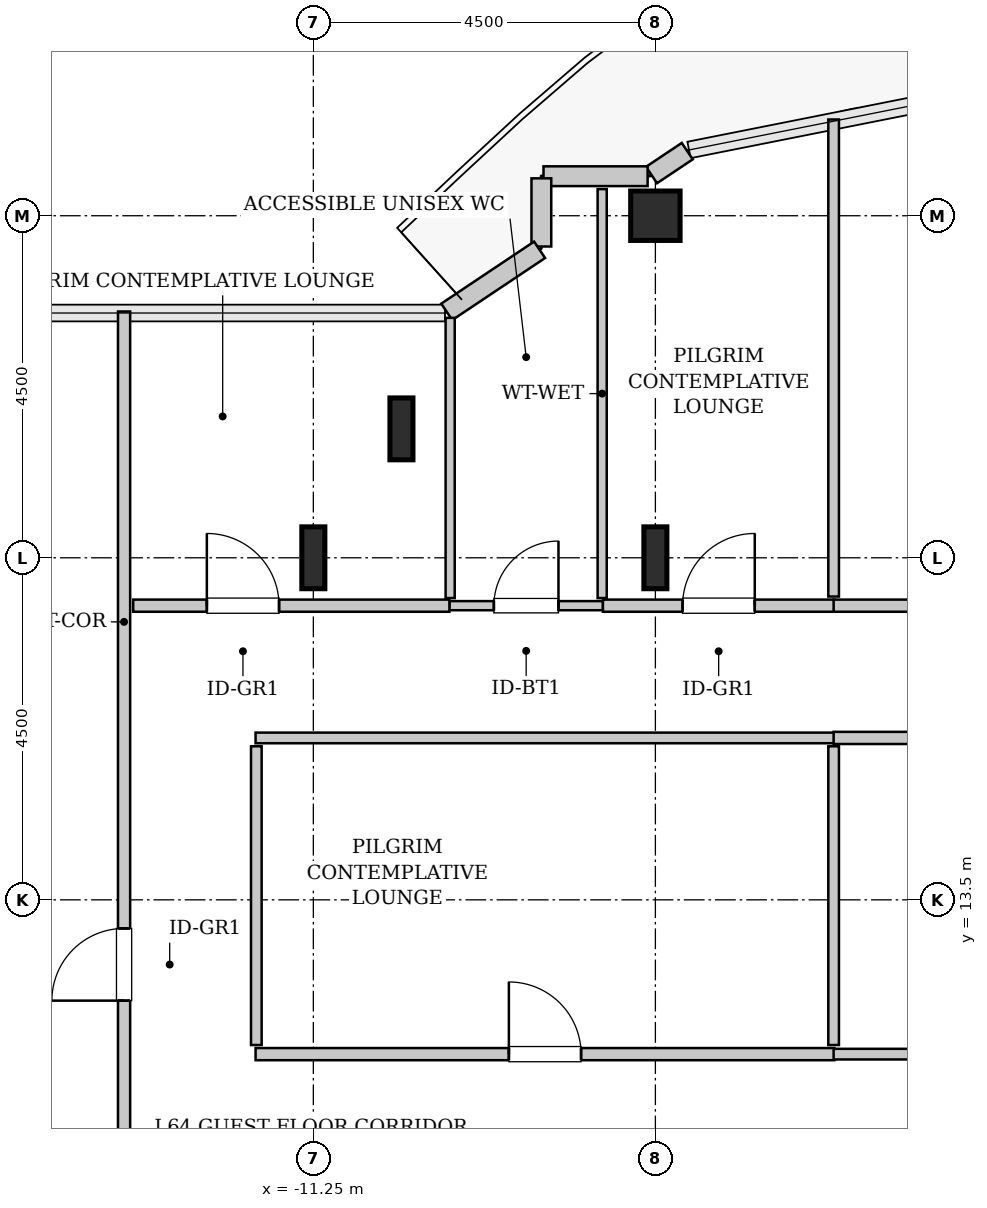
"""IFC4 building model, lengths in metres.
Left out: names, types, materials, properties, quantities, classifications, styles, units other than length and angle.
Written with IfcOpenShell. Run it as: python <this file> out.ifc"""

import sys

from ifc_helpers import new_model, si_unit, direction, frame, frame_2d, origin, origin_2d, place, context, subcontext, project, spatial, rectangle, hollow_rectangle, i_section, extrude, source, transform, mapped, element, fill, save


model = new_model("IFC4")
c1 = context("Model", 3, precision=1e-05, world=origin(), true_north=direction((0.0, 1.0)))
c2 = subcontext(c1, "Body", "Model", "MODEL_VIEW")
j1 = project(units=[si_unit("LENGTHUNIT", "METRE"), si_unit("PLANEANGLEUNIT", "RADIAN")], contexts=[c1])
p1 = place(None, origin())
s1 = spatial("IfcSite", under=j1, at=p1, CompositionType="ELEMENT")
p2 = place(p1, origin())
s2 = spatial("IfcBuilding", under=s1, at=p2, CompositionType="ELEMENT")
p3 = place(p2, frame((0.0, 0.0, 256.0)))
s3 = spatial("IfcBuildingStorey", under=s2, at=p3, CompositionType="ELEMENT", Elevation=256.0)
m1 = source(origin(), c2, "Body", "SweptSolid", [
    extrude(i_section(OverallWidth=0.303, OverallDepth=0.814, WebThickness=0.021, FlangeThickness=0.04, FilletRadius=0.03, at=origin_2d()), origin(), (0.0, 0.0, 1.0), 3.8),
])
for number, where, z_axis, x_axis in (
    (1, (-11.25, 18.0, 0.0), (0.0, 0.0, 1.0), (1.0, 0.0, 0.0)),
    (2, (-10.091, 19.696, 0.0), (0.0, 0.0, 1.0), (1.0, 0.0, 0.0)),
    (3, (-6.75, 18.0, 0.0), (0.0, 0.0, 1.0), (1.0, 0.0, 0.0)),
):
    element("IfcColumn", number, at=place(p3, frame(where, z_axis=z_axis, x_axis=x_axis)), inside=s3, PredefinedType="COLUMN", context=c2, shape_type="MappedRepresentation", body=[
        mapped(m1, transform((0.0, 0.0, 0.0), x_axis=(1.0, 0.0, 0.0), y_axis=(0.0, 1.0, 0.0), z_axis=(0.0, 0.0, 1.0), scale=1.0)),
    ])
m2 = source(origin(), c2, "Body", "SweptSolid", [
    extrude(hollow_rectangle(XDim=0.65, YDim=0.65, WallThickness=0.032, InnerFilletRadius=0.032, OuterFilletRadius=0.064, at=origin_2d()), origin(), (0.0, 0.0, 1.0), 3.8),
])
p4 = place(p3, frame((-6.75, 22.5, 0.0), z_axis=(0.0, 0.0, 1.0), x_axis=(1.0, 0.0, 0.0)))
e4 = element("IfcColumn", 4, at=p4, inside=s3, PredefinedType="COLUMN", context=c2, shape_type="MappedRepresentation", body=[
    mapped(m2, transform((0.0, 0.0, 0.0), x_axis=(1.0, 0.0, 0.0), y_axis=(0.0, 1.0, 0.0), z_axis=(0.0, 0.0, 1.0), scale=1.0)),
])
m3 = source(origin(), c2, "Body", "SweptSolid", [
    extrude(rectangle(XDim=0.565, YDim=0.26, at=frame_2d((0.283, 0.0))), origin(), (0.0, 0.0, 1.0), 3.5),
])
p5 = place(p3, frame((-6.331, 23.35, 0.0), z_axis=(0.0, 0.0, 1.0), x_axis=(-0.831651492666, -0.555297933317, 0.0)))
e5 = element("IfcWall", 5, at=p5, inside=s3, PredefinedType="SOLIDWALL", context=c2, shape_type="MappedRepresentation", body=[
    mapped(m3, transform((0.0, 0.0, 0.0), x_axis=(1.0, 0.0, 0.0), y_axis=(0.0, 1.0, 0.0), z_axis=(0.0, 0.0, 1.0), scale=1.0)),
])
m4 = source(origin(), c2, "Body", "SweptSolid", [
    extrude(rectangle(XDim=1.37, YDim=0.26, at=frame_2d((0.685, 0.0))), origin(), (0.0, 0.0, 1.0), 3.5),
])
p6 = place(p3, frame((-6.852, 23.02, 0.0), z_axis=(0.0, 0.0, 1.0), x_axis=(-1.0, 0.0, 0.0)))
e6 = element("IfcWall", 6, at=p6, inside=s3, PredefinedType="SOLIDWALL", context=c2, shape_type="MappedRepresentation", body=[
    mapped(m4, transform((0.0, 0.0, 0.0), x_axis=(1.0, 0.0, 0.0), y_axis=(0.0, 1.0, 0.0), z_axis=(0.0, 0.0, 1.0), scale=1.0)),
])
m5 = source(origin(), c2, "Body", "SweptSolid", [
    extrude(rectangle(XDim=0.897, YDim=0.26, at=frame_2d((0.448, 0.0))), origin(), (0.0, 0.0, 1.0), 3.5),
])
p7 = place(p3, frame((-8.25, 22.992, 0.0), z_axis=(0.0, 0.0, 1.0), x_axis=(0.0, -1.0, 0.0)))
e7 = element("IfcWall", 7, at=p7, inside=s3, PredefinedType="SOLIDWALL", context=c2, shape_type="MappedRepresentation", body=[
    mapped(m5, transform((0.0, 0.0, 0.0), x_axis=(1.0, 0.0, 0.0), y_axis=(0.0, 1.0, 0.0), z_axis=(0.0, 0.0, 1.0), scale=1.0)),
])
m6 = source(origin(), c2, "Body", "SweptSolid", [
    extrude(rectangle(XDim=1.469, YDim=0.26, at=frame_2d((0.734, 0.0))), origin(), (0.0, 0.0, 1.0), 3.5),
])
p8 = place(p3, frame((-8.273, 22.052, 0.0), z_axis=(0.0, 0.0, 1.0), x_axis=(-0.831461760506, -0.555581983884, 0.0)))
e8 = element("IfcWall", 8, at=p8, inside=s3, PredefinedType="SOLIDWALL", context=c2, shape_type="MappedRepresentation", body=[
    mapped(m6, transform((0.0, 0.0, 0.0), x_axis=(1.0, 0.0, 0.0), y_axis=(0.0, 1.0, 0.0), z_axis=(0.0, 0.0, 1.0), scale=1.0)),
])
m7 = source(origin(), c2, "Body", "SweptSolid", [
    extrude(rectangle(XDim=2.02, YDim=0.12, at=frame_2d((1.01, 0.0))), origin(), (0.0, 0.0, 1.0), 3.485),
])
p9 = place(p3, frame((-9.46, 17.37, 0.0), z_axis=(0.0, 0.0, 1.0), x_axis=(1.0, 0.0, 0.0)))
e9 = element("IfcWall", 9, at=p9, inside=s3, PredefinedType="PLUMBINGWALL", context=c2, shape_type="MappedRepresentation", body=[
    mapped(m7, transform((0.0, 0.0, 0.0), x_axis=(1.0, 0.0, 0.0), y_axis=(0.0, 1.0, 0.0), z_axis=(0.0, 0.0, 1.0), scale=1.0)),
])
p10 = place(p9, frame((0.585, 0.0, 0.0)))
e10 = element("IfcOpeningElement", 10, at=p10, cuts=e9, PredefinedType="OPENING", context=c2, shape_type="SweptSolid", body=[
    extrude(rectangle(XDim=0.85, YDim=2.1, at=frame_2d((0.425, 1.05))), frame((0.0, 0.07, 0.0), z_axis=(0.0, -1.0, 0.0), x_axis=(1.0, 0.0, 0.0)), (0.0, 0.0, 1.0), 0.14),
])
m8 = source(origin(), c2, "Body", "SweptSolid", [
    extrude(rectangle(XDim=5.38, YDim=0.12, at=frame_2d((2.69, 0.0))), origin(), (0.0, 0.0, 1.0), 3.485),
])
p11 = place(p3, frame((-7.45, 17.47, 0.0), z_axis=(0.0, 0.0, 1.0), x_axis=(0.0, 1.0, 0.0)))
e11 = element("IfcWall", 11, at=p11, inside=s3, PredefinedType="PLUMBINGWALL", context=c2, shape_type="MappedRepresentation", body=[
    mapped(m8, transform((0.0, 0.0, 0.0), x_axis=(1.0, 0.0, 0.0), y_axis=(0.0, 1.0, 0.0), z_axis=(0.0, 0.0, 1.0), scale=1.0)),
])
m9 = source(origin(), c2, "Body", "SweptSolid", [
    extrude(rectangle(XDim=3.687, YDim=0.12, at=frame_2d((1.843, 0.0))), origin(), (0.0, 0.0, 1.0), 3.485),
])
p12 = place(p3, frame((-9.45, 17.47, 0.0), z_axis=(0.0, 0.0, 1.0), x_axis=(0.0, 1.0, 0.0)))
e12 = element("IfcWall", 12, at=p12, inside=s3, PredefinedType="PLUMBINGWALL", context=c2, shape_type="MappedRepresentation", body=[
    mapped(m9, transform((0.0, 0.0, 0.0), x_axis=(1.0, 0.0, 0.0), y_axis=(0.0, 1.0, 0.0), z_axis=(0.0, 0.0, 1.0), scale=1.0)),
])
m10 = source(origin(), c2, "Body", "SweptSolid", [
    extrude(rectangle(XDim=13.353, YDim=0.16, at=frame_2d((6.676, 0.0))), origin(), (0.0, 0.0, 1.0), 3.485),
])
p13 = place(p3, frame((-13.74, 7.887, 0.0), z_axis=(0.0, 0.0, 1.0), x_axis=(0.0, 1.0, 0.0)))
e13 = element("IfcWall", 13, at=p13, inside=s3, PredefinedType="PARTITIONING", context=c2, shape_type="MappedRepresentation", body=[
    mapped(m10, transform((0.0, 0.0, 0.0), x_axis=(1.0, 0.0, 0.0), y_axis=(0.0, 1.0, 0.0), z_axis=(0.0, 0.0, 1.0), scale=1.0)),
])
p14 = place(p13, frame((4.286, 0.0, 0.0)))
e14 = element("IfcOpeningElement", 14, at=p14, cuts=e13, PredefinedType="OPENING", context=c2, shape_type="SweptSolid", body=[
    extrude(rectangle(XDim=0.95, YDim=2.1, at=frame_2d((0.475, 1.05))), frame((0.0, 0.09, 0.0), z_axis=(0.0, -1.0, 0.0), x_axis=(1.0, 0.0, 0.0)), (0.0, 0.0, 1.0), 0.18),
])
m11 = source(origin(), c2, "Body", "SweptSolid", [
    extrude(rectangle(XDim=7.615, YDim=0.16, at=frame_2d((3.808, 0.0))), origin(), (0.0, 0.0, 1.0), 3.485),
])
p15 = place(p3, frame((-12.01, 11.47, 0.0), z_axis=(0.0, 0.0, 1.0), x_axis=(1.0, 0.0, 0.0)))
e15 = element("IfcWall", 15, at=p15, inside=s3, PredefinedType="PARTITIONING", context=c2, shape_type="MappedRepresentation", body=[
    mapped(m11, transform((0.0, 0.0, 0.0), x_axis=(1.0, 0.0, 0.0), y_axis=(0.0, 1.0, 0.0), z_axis=(0.0, 0.0, 1.0), scale=1.0)),
])
p16 = place(p15, frame((3.333, 0.0, 0.0)))
e16 = element("IfcOpeningElement", 16, at=p16, cuts=e15, PredefinedType="OPENING", context=c2, shape_type="SweptSolid", body=[
    extrude(rectangle(XDim=0.95, YDim=2.1, at=frame_2d((0.475, 1.05))), frame((0.0, 0.09, 0.0), z_axis=(0.0, -1.0, 0.0), x_axis=(1.0, 0.0, 0.0)), (0.0, 0.0, 1.0), 0.18),
])
m12 = source(origin(), c2, "Body", "SweptSolid", [
    extrude(rectangle(XDim=7.615, YDim=0.14, at=frame_2d((3.808, 0.0))), origin(), (0.0, 0.0, 1.0), 3.485),
])
p17 = place(p3, frame((-12.01, 15.63, 0.0), z_axis=(0.0, 0.0, 1.0), x_axis=(1.0, 0.0, 0.0)))
e17 = element("IfcWall", 17, at=p17, inside=s3, PredefinedType="PARTITIONING", context=c2, shape_type="MappedRepresentation", body=[
    mapped(m12, transform((0.0, 0.0, 0.0), x_axis=(1.0, 0.0, 0.0), y_axis=(0.0, 1.0, 0.0), z_axis=(0.0, 0.0, 1.0), scale=1.0)),
])
m13 = source(origin(), c2, "Body", "SweptSolid", [
    extrude(rectangle(XDim=3.93, YDim=0.14, at=frame_2d((1.965, 0.0))), origin(), (0.0, 0.0, 1.0), 3.485),
])
for number, where, z_axis, x_axis in (
    (18, (-12.0, 11.59, 0.0), (0.0, 0.0, 1.0), (0.0, 1.0, 0.0)),
    (19, (-4.405, 11.59, 0.0), (0.0, 0.0, 1.0), (0.0, 1.0, 0.0)),
):
    element("IfcWall", number, at=place(p3, frame(where, z_axis=z_axis, x_axis=x_axis)), inside=s3, PredefinedType="PARTITIONING", context=c2, shape_type="MappedRepresentation", body=[
        mapped(m13, transform((0.0, 0.0, 0.0), x_axis=(1.0, 0.0, 0.0), y_axis=(0.0, 1.0, 0.0), z_axis=(0.0, 0.0, 1.0), scale=1.0)),
    ])
m14 = source(origin(), c2, "Body", "SweptSolid", [
    extrude(rectangle(XDim=3.045, YDim=0.16, at=frame_2d((1.522, 0.0))), origin(), (0.0, 0.0, 1.0), 3.485),
])
p18 = place(p3, frame((-7.44, 17.37, 0.0), z_axis=(0.0, 0.0, 1.0), x_axis=(1.0, 0.0, 0.0)))
e20 = element("IfcWall", 20, at=p18, inside=s3, PredefinedType="PARTITIONING", context=c2, shape_type="MappedRepresentation", body=[
    mapped(m14, transform((0.0, 0.0, 0.0), x_axis=(1.0, 0.0, 0.0), y_axis=(0.0, 1.0, 0.0), z_axis=(0.0, 0.0, 1.0), scale=1.0)),
])
p19 = place(p18, frame((1.048, 0.0, 0.0)))
e21 = element("IfcOpeningElement", 21, at=p19, cuts=e20, PredefinedType="OPENING", context=c2, shape_type="SweptSolid", body=[
    extrude(rectangle(XDim=0.95, YDim=2.1, at=frame_2d((0.475, 1.05))), frame((0.0, 0.09, 0.0), z_axis=(0.0, -1.0, 0.0), x_axis=(1.0, 0.0, 0.0)), (0.0, 0.0, 1.0), 0.18),
])
m15 = source(origin(), c2, "Body", "SweptSolid", [
    extrude(rectangle(XDim=6.276, YDim=0.14, at=frame_2d((3.138, 0.0))), origin(), (0.0, 0.0, 1.0), 3.485),
])
p20 = place(p3, frame((-4.405, 17.49, 0.0), z_axis=(0.0, 0.0, 1.0), x_axis=(0.0, 1.0, 0.0)))
e22 = element("IfcWall", 22, at=p20, inside=s3, PredefinedType="PARTITIONING", context=c2, shape_type="MappedRepresentation", body=[
    mapped(m15, transform((0.0, 0.0, 0.0), x_axis=(1.0, 0.0, 0.0), y_axis=(0.0, 1.0, 0.0), z_axis=(0.0, 0.0, 1.0), scale=1.0)),
])
m16 = source(origin(), c2, "Body", "SweptSolid", [
    extrude(rectangle(XDim=4.16, YDim=0.16, at=frame_2d((2.08, 0.0))), origin(), (0.0, 0.0, 1.0), 3.485),
])
p21 = place(p3, frame((-13.62, 17.37, 0.0), z_axis=(0.0, 0.0, 1.0), x_axis=(1.0, 0.0, 0.0)))
e23 = element("IfcWall", 23, at=p21, inside=s3, PredefinedType="PARTITIONING", context=c2, shape_type="MappedRepresentation", body=[
    mapped(m16, transform((0.0, 0.0, 0.0), x_axis=(1.0, 0.0, 0.0), y_axis=(0.0, 1.0, 0.0), z_axis=(0.0, 0.0, 1.0), scale=1.0)),
])
p22 = place(p21, frame((0.969, 0.0, 0.0)))
e24 = element("IfcOpeningElement", 24, at=p22, cuts=e23, PredefinedType="OPENING", context=c2, shape_type="SweptSolid", body=[
    extrude(rectangle(XDim=0.95, YDim=2.1, at=frame_2d((0.475, 1.05))), frame((0.0, 0.09, 0.0), z_axis=(0.0, -1.0, 0.0), x_axis=(1.0, 0.0, 0.0)), (0.0, 0.0, 1.0), 0.18),
])
m17 = source(origin(), c2, "Body", "SweptSolid", [
    extrude(rectangle(XDim=7.01, YDim=0.16, at=frame_2d((3.505, 0.0))), origin(), (0.0, 0.0, 1.0), 3.485),
])
p23 = place(p3, frame((-4.405, 17.37, 0.0), z_axis=(0.0, 0.0, 1.0), x_axis=(1.0, 0.0, 0.0)))
e25 = element("IfcWall", 25, at=p23, inside=s3, PredefinedType="PARTITIONING", context=c2, shape_type="MappedRepresentation", body=[
    mapped(m17, transform((0.0, 0.0, 0.0), x_axis=(1.0, 0.0, 0.0), y_axis=(0.0, 1.0, 0.0), z_axis=(0.0, 0.0, 1.0), scale=1.0)),
])
p24 = place(p23, frame((3.03, 0.0, 0.0)))
e26 = element("IfcOpeningElement", 26, at=p24, cuts=e25, PredefinedType="OPENING", context=c2, shape_type="SweptSolid", body=[
    extrude(rectangle(XDim=0.95, YDim=2.1, at=frame_2d((0.475, 1.05))), frame((0.0, 0.09, 0.0), z_axis=(0.0, -1.0, 0.0), x_axis=(1.0, 0.0, 0.0)), (0.0, 0.0, 1.0), 0.18),
])
p25 = place(p3, frame((-4.405, 15.63, 0.0), z_axis=(0.0, 0.0, 1.0), x_axis=(1.0, 0.0, 0.0)))
e27 = element("IfcWall", 27, at=p25, inside=s3, PredefinedType="PARTITIONING", context=c2, shape_type="MappedRepresentation", body=[
    mapped(m17, transform((0.0, 0.0, 0.0), x_axis=(1.0, 0.0, 0.0), y_axis=(0.0, 1.0, 0.0), z_axis=(0.0, 0.0, 1.0), scale=1.0)),
])
p26 = place(p25, frame((3.03, 0.0, 0.0)))
e28 = element("IfcOpeningElement", 28, at=p26, cuts=e27, PredefinedType="OPENING", context=c2, shape_type="SweptSolid", body=[
    extrude(rectangle(XDim=0.95, YDim=2.1, at=frame_2d((0.475, 1.05))), frame((0.0, 0.09, 0.0), z_axis=(0.0, -1.0, 0.0), x_axis=(1.0, 0.0, 0.0)), (0.0, 0.0, 1.0), 0.18),
])
m18 = source(origin(), c2, "Body", "SweptSolid", [
    extrude(rectangle(XDim=7.01, YDim=0.14, at=frame_2d((3.505, 0.0))), origin(), (0.0, 0.0, 1.0), 3.485),
])
p27 = place(p3, frame((-4.405, 11.47, 0.0), z_axis=(0.0, 0.0, 1.0), x_axis=(1.0, 0.0, 0.0)))
e29 = element("IfcWall", 29, at=p27, inside=s3, PredefinedType="PARTITIONING", context=c2, shape_type="MappedRepresentation", body=[
    mapped(m18, transform((0.0, 0.0, 0.0), x_axis=(1.0, 0.0, 0.0), y_axis=(0.0, 1.0, 0.0), z_axis=(0.0, 0.0, 1.0), scale=1.0)),
])
m19 = source(origin(), c2, "Body", "SweptSolid", [
    extrude(rectangle(XDim=0.85, YDim=2.1, at=frame_2d((0.425, 1.05))), frame((0.0, 0.025, 0.0), z_axis=(0.0, -1.0, 0.0), x_axis=(1.0, 0.0, 0.0)), (0.0, 0.0, 1.0), 0.05),
])
p28 = place(p10, origin())
e30 = element("IfcDoor", 30, at=p28, inside=s3, OperationType="SINGLE_SWING_RIGHT", PredefinedType="DOOR", context=c2, shape_type="MappedRepresentation", body=[
    mapped(m19, transform((0.0, 0.0, 0.0), x_axis=(1.0, 0.0, 0.0), y_axis=(0.0, 1.0, 0.0), z_axis=(0.0, 0.0, 1.0), scale=1.0)),
])
fill(e10, e30)
m20 = source(origin(), c2, "Body", "SweptSolid", [
    extrude(rectangle(XDim=0.95, YDim=2.1, at=frame_2d((0.475, 1.05))), frame((0.0, 0.025, 0.0), z_axis=(0.0, -1.0, 0.0), x_axis=(1.0, 0.0, 0.0)), (0.0, 0.0, 1.0), 0.05),
])
p29 = place(p14, origin())
e31 = element("IfcDoor", 31, at=p29, inside=s3, OperationType="SINGLE_SWING_LEFT", PredefinedType="DOOR", context=c2, shape_type="MappedRepresentation", body=[
    mapped(m20, transform((0.0, 0.0, 0.0), x_axis=(1.0, 0.0, 0.0), y_axis=(0.0, 1.0, 0.0), z_axis=(0.0, 0.0, 1.0), scale=1.0)),
])
fill(e14, e31)
p30 = place(p16, origin())
e32 = element("IfcDoor", 32, at=p30, inside=s3, OperationType="SINGLE_SWING_LEFT", PredefinedType="DOOR", context=c2, shape_type="MappedRepresentation", body=[
    mapped(m20, transform((0.0, 0.0, 0.0), x_axis=(1.0, 0.0, 0.0), y_axis=(0.0, 1.0, 0.0), z_axis=(0.0, 0.0, 1.0), scale=1.0)),
])
fill(e16, e32)
p31 = place(p19, origin())
e33 = element("IfcDoor", 33, at=p31, inside=s3, OperationType="SINGLE_SWING_RIGHT", PredefinedType="DOOR", context=c2, shape_type="MappedRepresentation", body=[
    mapped(m20, transform((0.0, 0.0, 0.0), x_axis=(1.0, 0.0, 0.0), y_axis=(0.0, 1.0, 0.0), z_axis=(0.0, 0.0, 1.0), scale=1.0)),
])
fill(e21, e33)
p32 = place(p22, origin())
e34 = element("IfcDoor", 34, at=p32, inside=s3, OperationType="SINGLE_SWING_LEFT", PredefinedType="DOOR", context=c2, shape_type="MappedRepresentation", body=[
    mapped(m20, transform((0.0, 0.0, 0.0), x_axis=(1.0, 0.0, 0.0), y_axis=(0.0, 1.0, 0.0), z_axis=(0.0, 0.0, 1.0), scale=1.0)),
])
fill(e24, e34)
save(model, sys.argv[1])
